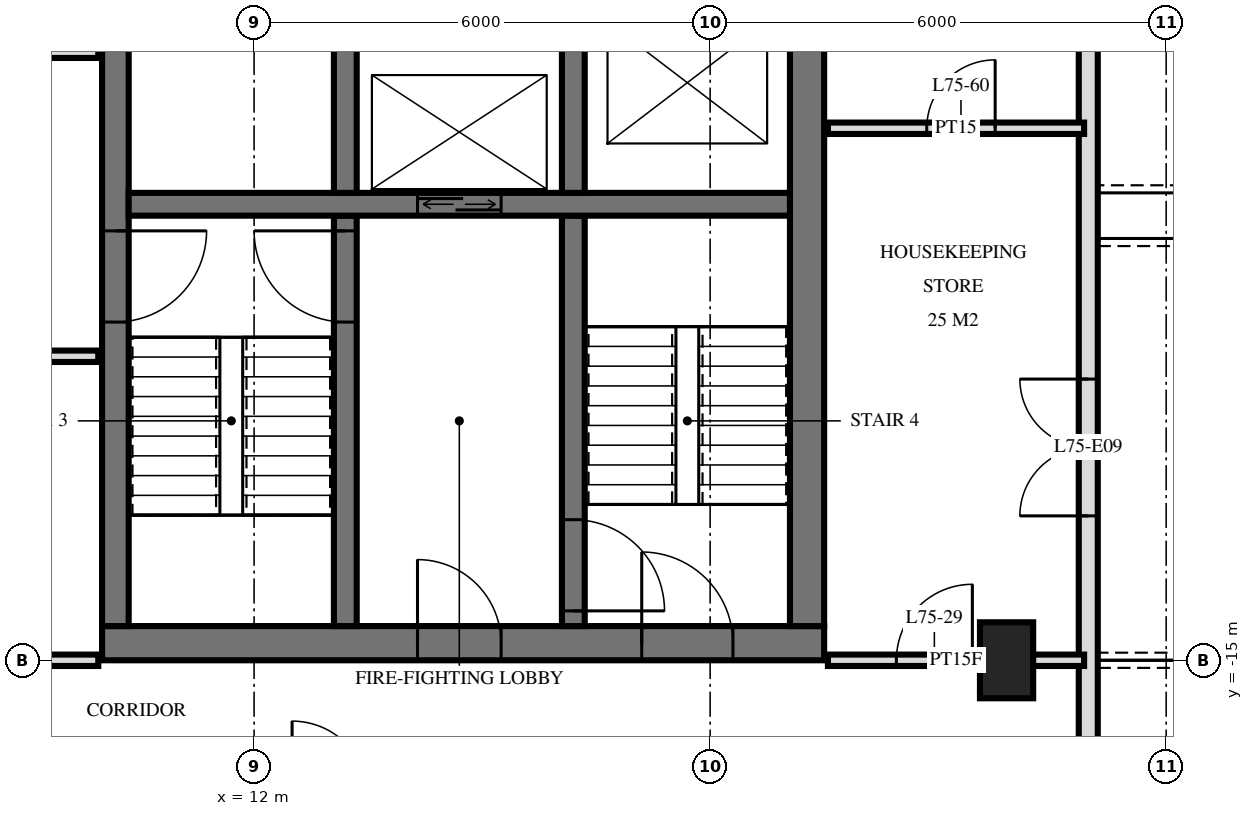
"""IFC4 building model, lengths in metres.
Left out: names, types, materials, properties, quantities, classifications, styles, units other than length and angle.
Written with IfcOpenShell. Run it as: python <this file> out.ifc"""

import sys

from ifc_helpers import new_model, si_unit, direction, frame, frame_2d, origin, origin_2d, place, context, subcontext, project, spatial, rectangle, extrude, element, fill, save


model = new_model("IFC4")
c1 = context("Model", 3, precision=1e-05, world=origin(), true_north=direction((0.0, 1.0)))
c2 = subcontext(c1, "Body", "Model", "MODEL_VIEW")
j1 = project(units=[si_unit("LENGTHUNIT", "METRE"), si_unit("PLANEANGLEUNIT", "RADIAN")], contexts=[c1])
p1 = place(None, origin())
s1 = spatial("IfcSite", under=j1, at=p1, CompositionType="ELEMENT")
p2 = place(p1, origin())
s2 = spatial("IfcBuilding", under=s1, at=p2, CompositionType="ELEMENT")
p3 = place(p2, frame((0.0, 0.0, 284.1)))
s3 = spatial("IfcBuildingStorey", under=s2, at=p3, CompositionType="ELEMENT", Elevation=284.1)
p4 = place(p3, frame((21.9, -15.0, 0.0), z_axis=(0.0, 0.0, 1.0), x_axis=(0.0, 1.0, 0.0)))
e1 = element("IfcColumn", 1, at=p4, inside=s3, PredefinedType="COLUMN", context=c2, shape_type="SweptSolid", body=[
    extrude(rectangle(XDim=1.0, YDim=0.7, at=origin_2d()), origin(), (0.0, 0.0, 1.0), 3.5),
])
p5 = place(p3, frame((10.0, -14.775, 0.0), z_axis=(0.0, 0.0, 1.0), x_axis=(1.0, 0.0, 0.0)))
e2 = element("IfcWall", 2, at=p5, inside=s3, PredefinedType="SHEAR", context=c2, shape_type="SweptSolid", body=[
    extrude(rectangle(XDim=9.5, YDim=0.45, at=frame_2d((4.75, 0.0))), origin(), (0.0, 0.0, 1.0), 3.5),
])
p6 = place(p5, frame((7.1, 0.0, 0.0)))
e3 = element("IfcOpeningElement", 3, at=p6, cuts=e2, PredefinedType="OPENING", context=c2, shape_type="SweptSolid", body=[
    extrude(rectangle(XDim=1.2, YDim=2.1, at=frame_2d((0.6, 1.05))), frame((0.0, 0.235, 0.0), z_axis=(0.0, -1.0, 0.0), x_axis=(1.0, 0.0, 0.0)), (0.0, 0.0, 1.0), 0.47),
])
p7 = place(p5, frame((4.15, 0.0, 0.0)))
e4 = element("IfcOpeningElement", 4, at=p7, cuts=e2, PredefinedType="OPENING", context=c2, shape_type="SweptSolid", body=[
    extrude(rectangle(XDim=1.1, YDim=2.1, at=frame_2d((0.55, 1.05))), frame((0.0, 0.235, 0.0), z_axis=(0.0, -1.0, 0.0), x_axis=(1.0, 0.0, 0.0)), (0.0, 0.0, 1.0), 0.47),
])
p8 = place(p3, frame((10.175, -14.55, 0.0), z_axis=(0.0, 0.0, 1.0), x_axis=(0.0, 1.0, 0.0)))
e5 = element("IfcWall", 5, at=p8, inside=s3, PredefinedType="SHEAR", context=c2, shape_type="SweptSolid", body=[
    extrude(rectangle(XDim=14.1, YDim=0.35, at=frame_2d((7.05, 0.0))), origin(), (0.0, 0.0, 1.0), 3.5),
])
p9 = place(p8, frame((8.4, 0.0, 0.0)))
e6 = element("IfcOpeningElement", 6, at=p9, cuts=e5, PredefinedType="OPENING", context=c2, shape_type="SweptSolid", body=[
    extrude(rectangle(XDim=1.4, YDim=2.4, at=frame_2d((0.7, 1.2))), frame((0.0, 0.185, 0.0), z_axis=(0.0, -1.0, 0.0), x_axis=(1.0, 0.0, 0.0)), (0.0, 0.0, 1.0), 0.37),
])
p10 = place(p8, frame((10.0, 0.0, 0.0)))
e7 = element("IfcOpeningElement", 7, at=p10, cuts=e5, PredefinedType="OPENING", context=c2, shape_type="SweptSolid", body=[
    extrude(rectangle(XDim=1.4, YDim=2.4, at=frame_2d((0.7, 1.2))), frame((0.0, 0.185, 0.0), z_axis=(0.0, -1.0, 0.0), x_axis=(1.0, 0.0, 0.0)), (0.0, 0.0, 1.0), 0.37),
])
p11 = place(p8, frame((4.0, 0.0, 0.0)))
e8 = element("IfcOpeningElement", 8, at=p11, cuts=e5, PredefinedType="OPENING", context=c2, shape_type="SweptSolid", body=[
    extrude(rectangle(XDim=1.2, YDim=2.1, at=frame_2d((0.6, 1.05))), frame((0.0, 0.185, 0.0), z_axis=(0.0, -1.0, 0.0), x_axis=(1.0, 0.0, 0.0)), (0.0, 0.0, 1.0), 0.37),
])
p12 = place(p3, frame((19.275, -14.55, 0.0), z_axis=(0.0, 0.0, 1.0), x_axis=(0.0, 1.0, 0.0)))
e9 = element("IfcWall", 9, at=p12, inside=s3, PredefinedType="SHEAR", context=c2, shape_type="SweptSolid", body=[
    extrude(rectangle(XDim=14.1, YDim=0.45, at=frame_2d((7.05, 0.0))), origin(), (0.0, 0.0, 1.0), 3.5),
])
p13 = place(p3, frame((10.35, -9.0, 0.0), z_axis=(0.0, 0.0, 1.0), x_axis=(1.0, 0.0, 0.0)))
e10 = element("IfcWall", 10, at=p13, inside=s3, PredefinedType="SHEAR", context=c2, shape_type="SweptSolid", body=[
    extrude(rectangle(XDim=8.7, YDim=0.3, at=frame_2d((4.35, 0.0))), origin(), (0.0, 0.0, 1.0), 3.5),
])
p14 = place(p13, frame((3.8, 0.0, 0.0)))
e11 = element("IfcOpeningElement", 11, at=p14, cuts=e10, PredefinedType="OPENING", context=c2, shape_type="SweptSolid", body=[
    extrude(rectangle(XDim=1.1, YDim=2.1, at=frame_2d((0.55, 1.05))), frame((0.0, 0.16, 0.0), z_axis=(0.0, -1.0, 0.0), x_axis=(1.0, 0.0, 0.0)), (0.0, 0.0, 1.0), 0.32),
])
p15 = place(p3, frame((13.2, -8.85, 0.0), z_axis=(0.0, 0.0, 1.0), x_axis=(0.0, 1.0, 0.0)))
e12 = element("IfcWall", 12, at=p15, inside=s3, PredefinedType="SHEAR", context=c2, shape_type="SweptSolid", body=[
    extrude(rectangle(XDim=2.3, YDim=0.3, at=frame_2d((1.15, 0.0))), origin(), (0.0, 0.0, 1.0), 3.5),
])
p16 = place(p3, frame((13.2, -14.55, 0.0), z_axis=(0.0, 0.0, 1.0), x_axis=(0.0, 1.0, 0.0)))
e13 = element("IfcWall", 13, at=p16, inside=s3, PredefinedType="SHEAR", context=c2, shape_type="SweptSolid", body=[
    extrude(rectangle(XDim=5.4, YDim=0.3, at=frame_2d((2.7, 0.0))), origin(), (0.0, 0.0, 1.0), 3.5),
])
p17 = place(p16, frame((4.0, 0.0, 0.0)))
e14 = element("IfcOpeningElement", 14, at=p17, cuts=e13, PredefinedType="OPENING", context=c2, shape_type="SweptSolid", body=[
    extrude(rectangle(XDim=1.2, YDim=2.1, at=frame_2d((0.6, 1.05))), frame((0.0, 0.16, 0.0), z_axis=(0.0, -1.0, 0.0), x_axis=(1.0, 0.0, 0.0)), (0.0, 0.0, 1.0), 0.32),
])
p18 = place(p3, frame((16.2, -8.85, 0.0), z_axis=(0.0, 0.0, 1.0), x_axis=(0.0, 1.0, 0.0)))
e15 = element("IfcWall", 15, at=p18, inside=s3, PredefinedType="SHEAR", context=c2, shape_type="SweptSolid", body=[
    extrude(rectangle(XDim=2.3, YDim=0.3, at=frame_2d((1.15, 0.0))), origin(), (0.0, 0.0, 1.0), 3.5),
])
p19 = place(p3, frame((16.2, -14.55, 0.0), z_axis=(0.0, 0.0, 1.0), x_axis=(0.0, 1.0, 0.0)))
e16 = element("IfcWall", 16, at=p19, inside=s3, PredefinedType="SHEAR", context=c2, shape_type="SweptSolid", body=[
    extrude(rectangle(XDim=5.4, YDim=0.3, at=frame_2d((2.7, 0.0))), origin(), (0.0, 0.0, 1.0), 3.5),
])
p20 = place(p19, frame((0.2, 0.0, 0.0)))
e17 = element("IfcOpeningElement", 17, at=p20, cuts=e16, PredefinedType="OPENING", context=c2, shape_type="SweptSolid", body=[
    extrude(rectangle(XDim=1.2, YDim=2.1, at=frame_2d((0.6, 1.05))), frame((0.0, 0.16, 0.0), z_axis=(0.0, -1.0, 0.0), x_axis=(1.0, 0.0, 0.0)), (0.0, 0.0, 1.0), 0.32),
])
p21 = place(p3, frame((22.975, -29.275, 0.0), z_axis=(0.0, 0.0, 1.0), x_axis=(0.0, 1.0, 0.0)))
e18 = element("IfcWall", 18, at=p21, inside=s3, PredefinedType="SOLIDWALL", context=c2, shape_type="SweptSolid", body=[
    extrude(rectangle(XDim=25.951, YDim=0.25, at=frame_2d((12.975, 0.0))), origin(), (0.0, 0.0, 1.0), 3.22),
])
p22 = place(p21, frame((0.575, 0.0, 0.0)))
e19 = element("IfcOpeningElement", 19, at=p22, cuts=e18, PredefinedType="OPENING", context=c2, shape_type="SweptSolid", body=[
    extrude(rectangle(XDim=1.8, YDim=2.4, at=frame_2d((0.9, 1.2))), frame((0.0, 0.135, 0.0), z_axis=(0.0, -1.0, 0.0), x_axis=(1.0, 0.0, 0.0)), (0.0, 0.0, 1.0), 0.27),
])
p23 = place(p21, frame((3.325, 0.0, 0.9)))
e20 = element("IfcOpeningElement", 20, at=p23, cuts=e18, PredefinedType="OPENING", context=c2, shape_type="SweptSolid", body=[
    extrude(rectangle(XDim=1.8, YDim=1.5, at=frame_2d((0.9, 0.75))), frame((0.0, 0.135, 0.0), z_axis=(0.0, -1.0, 0.0), x_axis=(1.0, 0.0, 0.0)), (0.0, 0.0, 1.0), 0.27),
])
p24 = place(p21, frame((9.475, 0.0, 0.0)))
e21 = element("IfcOpeningElement", 21, at=p24, cuts=e18, PredefinedType="OPENING", context=c2, shape_type="SweptSolid", body=[
    extrude(rectangle(XDim=1.8, YDim=2.4, at=frame_2d((0.9, 1.2))), frame((0.0, 0.135, 0.0), z_axis=(0.0, -1.0, 0.0), x_axis=(1.0, 0.0, 0.0)), (0.0, 0.0, 1.0), 0.27),
])
p25 = place(p21, frame((16.175, 0.0, 0.0)))
e22 = element("IfcOpeningElement", 22, at=p25, cuts=e18, PredefinedType="OPENING", context=c2, shape_type="SweptSolid", body=[
    extrude(rectangle(XDim=1.8, YDim=2.4, at=frame_2d((0.9, 1.2))), frame((0.0, 0.135, 0.0), z_axis=(0.0, -1.0, 0.0), x_axis=(1.0, 0.0, 0.0)), (0.0, 0.0, 1.0), 0.27),
])
p26 = place(p21, frame((22.675, 0.0, 0.0)))
e23 = element("IfcOpeningElement", 23, at=p26, cuts=e18, PredefinedType="OPENING", context=c2, shape_type="SweptSolid", body=[
    extrude(rectangle(XDim=1.8, YDim=2.4, at=frame_2d((0.9, 1.2))), frame((0.0, 0.135, 0.0), z_axis=(0.0, -1.0, 0.0), x_axis=(1.0, 0.0, 0.0)), (0.0, 0.0, 1.0), 0.27),
])
p27 = place(p3, frame((-9.95, -15.0, 0.0), z_axis=(0.0, 0.0, 1.0), x_axis=(1.0, 0.0, 0.0)))
e24 = element("IfcWall", 24, at=p27, inside=s3, PredefinedType="PARTITIONING", context=c2, shape_type="SweptSolid", body=[
    extrude(rectangle(XDim=19.9, YDim=0.15, at=frame_2d((9.95, 0.0))), origin(), (0.0, 0.0, 1.0), 2.584),
])
p28 = place(p27, frame((9.45, 0.0, 0.0)))
e25 = element("IfcOpeningElement", 25, at=p28, cuts=e24, PredefinedType="OPENING", context=c2, shape_type="SweptSolid", body=[
    extrude(rectangle(XDim=1.0, YDim=2.1, at=frame_2d((0.5, 1.05))), frame((0.0, 0.085, 0.0), z_axis=(0.0, -1.0, 0.0), x_axis=(1.0, 0.0, 0.0)), (0.0, 0.0, 1.0), 0.17),
])
p29 = place(p3, frame((19.55, -15.0, 0.0), z_axis=(0.0, 0.0, 1.0), x_axis=(1.0, 0.0, 0.0)))
e26 = element("IfcWall", 26, at=p29, inside=s3, PredefinedType="PARTITIONING", context=c2, shape_type="SweptSolid", body=[
    extrude(rectangle(XDim=3.37, YDim=0.15, at=frame_2d((1.685, 0.0))), origin(), (0.0, 0.0, 1.0), 3.22),
])
p30 = place(p29, frame((0.9, 0.0, 0.0)))
e27 = element("IfcOpeningElement", 27, at=p30, cuts=e26, PredefinedType="OPENING", context=c2, shape_type="SweptSolid", body=[
    extrude(rectangle(XDim=1.0, YDim=2.1, at=frame_2d((0.5, 1.05))), frame((0.0, 0.085, 0.0), z_axis=(0.0, -1.0, 0.0), x_axis=(1.0, 0.0, 0.0)), (0.0, 0.0, 1.0), 0.17),
])
p31 = place(p3, frame((-9.95, -11.0, 0.0), z_axis=(0.0, 0.0, 1.0), x_axis=(1.0, 0.0, 0.0)))
e28 = element("IfcWall", 28, at=p31, inside=s3, PredefinedType="PARTITIONING", context=c2, shape_type="SweptSolid", body=[
    extrude(rectangle(XDim=19.9, YDim=0.15, at=frame_2d((9.95, 0.0))), origin(), (0.0, 0.0, 1.0), 3.22),
])
p32 = place(p31, frame((9.45, 0.0, 0.0)))
e29 = element("IfcOpeningElement", 29, at=p32, cuts=e28, PredefinedType="OPENING", context=c2, shape_type="SweptSolid", body=[
    extrude(rectangle(XDim=1.0, YDim=2.1, at=frame_2d((0.5, 1.05))), frame((0.0, 0.085, 0.0), z_axis=(0.0, -1.0, 0.0), x_axis=(1.0, 0.0, 0.0)), (0.0, 0.0, 1.0), 0.17),
])
p33 = place(p31, frame((3.45, 0.0, 0.0)))
e30 = element("IfcOpeningElement", 30, at=p33, cuts=e28, PredefinedType="OPENING", context=c2, shape_type="SweptSolid", body=[
    extrude(rectangle(XDim=1.0, YDim=2.1, at=frame_2d((0.5, 1.05))), frame((0.0, 0.085, 0.0), z_axis=(0.0, -1.0, 0.0), x_axis=(1.0, 0.0, 0.0)), (0.0, 0.0, 1.0), 0.17),
])
p34 = place(p3, frame((19.55, -8.0, 0.0), z_axis=(0.0, 0.0, 1.0), x_axis=(1.0, 0.0, 0.0)))
e31 = element("IfcWall", 31, at=p34, inside=s3, PredefinedType="PARTITIONING", context=c2, shape_type="SweptSolid", body=[
    extrude(rectangle(XDim=3.37, YDim=0.15, at=frame_2d((1.685, 0.0))), origin(), (0.0, 0.0, 1.0), 3.22),
])
p35 = place(p34, frame((1.3, 0.0, 0.0)))
e32 = element("IfcOpeningElement", 32, at=p35, cuts=e31, PredefinedType="OPENING", context=c2, shape_type="SweptSolid", body=[
    extrude(rectangle(XDim=0.9, YDim=2.1, at=frame_2d((0.45, 1.05))), frame((0.0, 0.085, 0.0), z_axis=(0.0, -1.0, 0.0), x_axis=(1.0, 0.0, 0.0)), (0.0, 0.0, 1.0), 0.17),
])
p36 = place(p3, frame((-9.95, -7.0, 0.0), z_axis=(0.0, 0.0, 1.0), x_axis=(1.0, 0.0, 0.0)))
e33 = element("IfcWall", 33, at=p36, inside=s3, PredefinedType="PARTITIONING", context=c2, shape_type="SweptSolid", body=[
    extrude(rectangle(XDim=19.9, YDim=0.15, at=frame_2d((9.95, 0.0))), origin(), (0.0, 0.0, 1.0), 3.22),
])
p37 = place(p36, frame((9.45, 0.0, 0.0)))
e34 = element("IfcOpeningElement", 34, at=p37, cuts=e33, PredefinedType="OPENING", context=c2, shape_type="SweptSolid", body=[
    extrude(rectangle(XDim=1.0, YDim=2.1, at=frame_2d((0.5, 1.05))), frame((0.0, 0.085, 0.0), z_axis=(0.0, -1.0, 0.0), x_axis=(1.0, 0.0, 0.0)), (0.0, 0.0, 1.0), 0.17),
])
p38 = place(p36, frame((15.45, 0.0, 0.0)))
e35 = element("IfcOpeningElement", 35, at=p38, cuts=e33, PredefinedType="OPENING", context=c2, shape_type="SweptSolid", body=[
    extrude(rectangle(XDim=1.0, YDim=2.1, at=frame_2d((0.5, 1.05))), frame((0.0, 0.085, 0.0), z_axis=(0.0, -1.0, 0.0), x_axis=(1.0, 0.0, 0.0)), (0.0, 0.0, 1.0), 0.17),
])
p39 = place(p25, origin())
e36 = element("IfcDoor", 36, at=p39, inside=s3, OperationType="DOUBLE_DOOR_SINGLE_SWING", PredefinedType="DOOR", context=c2, shape_type="SweptSolid", body=[
    extrude(rectangle(XDim=1.8, YDim=2.4, at=frame_2d((0.9, 1.2))), frame((0.0, 0.025, 0.0), z_axis=(0.0, -1.0, 0.0), x_axis=(1.0, 0.0, 0.0)), (0.0, 0.0, 1.0), 0.05),
])
fill(e22, e36)
p40 = place(p14, origin())
e37 = element("IfcDoor", 37, at=p40, inside=s3, OperationType="DOUBLE_DOOR_SLIDING", PredefinedType="USERDEFINED", context=c2, shape_type="SweptSolid", body=[
    extrude(rectangle(XDim=1.1, YDim=2.1, at=frame_2d((0.55, 1.05))), frame((0.0, 0.025, 0.0), z_axis=(0.0, -1.0, 0.0), x_axis=(1.0, 0.0, 0.0)), (0.0, 0.0, 1.0), 0.05),
])
fill(e11, e37)
p41 = place(p11, frame((0.6, 0.0, 0.0), z_axis=(0.0, 0.0, 1.0), x_axis=(-1.0, 0.0, 0.0)))
e38 = element("IfcDoor", 38, at=p41, inside=s3, OperationType="SINGLE_SWING_RIGHT", PredefinedType="DOOR", context=c2, shape_type="SweptSolid", body=[
    extrude(rectangle(XDim=1.2, YDim=2.1, at=frame_2d((0.0, 1.05))), frame((0.0, -0.025, 0.0), z_axis=(0.0, 1.0, 0.0), x_axis=(-1.0, 0.0, 0.0)), (0.0, 0.0, 1.0), 0.05),
])
fill(e8, e38)
p42 = place(p6, origin())
e39 = element("IfcDoor", 39, at=p42, inside=s3, OperationType="SINGLE_SWING_RIGHT", PredefinedType="DOOR", context=c2, shape_type="SweptSolid", body=[
    extrude(rectangle(XDim=1.2, YDim=2.1, at=frame_2d((0.6, 1.05))), frame((0.0, 0.025, 0.0), z_axis=(0.0, -1.0, 0.0), x_axis=(1.0, 0.0, 0.0)), (0.0, 0.0, 1.0), 0.05),
])
fill(e3, e39)
p43 = place(p7, origin())
e40 = element("IfcDoor", 40, at=p43, inside=s3, OperationType="SINGLE_SWING_RIGHT", PredefinedType="DOOR", context=c2, shape_type="SweptSolid", body=[
    extrude(rectangle(XDim=1.1, YDim=2.1, at=frame_2d((0.55, 1.05))), frame((0.0, 0.025, 0.0), z_axis=(0.0, -1.0, 0.0), x_axis=(1.0, 0.0, 0.0)), (0.0, 0.0, 1.0), 0.05),
])
fill(e4, e40)
p44 = place(p17, origin())
e41 = element("IfcDoor", 41, at=p44, inside=s3, OperationType="SINGLE_SWING_LEFT", PredefinedType="DOOR", context=c2, shape_type="SweptSolid", body=[
    extrude(rectangle(XDim=1.2, YDim=2.1, at=frame_2d((0.6, 1.05))), frame((0.0, 0.025, 0.0), z_axis=(0.0, -1.0, 0.0), x_axis=(1.0, 0.0, 0.0)), (0.0, 0.0, 1.0), 0.05),
])
fill(e14, e41)
p45 = place(p20, frame((0.6, 0.0, 0.0), z_axis=(0.0, 0.0, 1.0), x_axis=(-1.0, 0.0, 0.0)))
e42 = element("IfcDoor", 42, at=p45, inside=s3, OperationType="SINGLE_SWING_LEFT", PredefinedType="DOOR", context=c2, shape_type="SweptSolid", body=[
    extrude(rectangle(XDim=1.2, YDim=2.1, at=frame_2d((0.0, 1.05))), frame((0.0, -0.025, 0.0), z_axis=(0.0, 1.0, 0.0), x_axis=(-1.0, 0.0, 0.0)), (0.0, 0.0, 1.0), 0.05),
])
fill(e17, e42)
p46 = place(p30, origin())
e43 = element("IfcDoor", 43, at=p46, inside=s3, OperationType="SINGLE_SWING_LEFT", PredefinedType="DOOR", context=c2, shape_type="SweptSolid", body=[
    extrude(rectangle(XDim=1.0, YDim=2.1, at=frame_2d((0.5, 1.05))), frame((0.0, 0.025, 0.0), z_axis=(0.0, -1.0, 0.0), x_axis=(1.0, 0.0, 0.0)), (0.0, 0.0, 1.0), 0.05),
])
fill(e27, e43)
p47 = place(p35, origin())
e44 = element("IfcDoor", 44, at=p47, inside=s3, OperationType="SINGLE_SWING_LEFT", PredefinedType="DOOR", context=c2, shape_type="SweptSolid", body=[
    extrude(rectangle(XDim=0.9, YDim=2.1, at=frame_2d((0.45, 1.05))), frame((0.0, 0.025, 0.0), z_axis=(0.0, -1.0, 0.0), x_axis=(1.0, 0.0, 0.0)), (0.0, 0.0, 1.0), 0.05),
])
fill(e32, e44)
save(model, sys.argv[1])
